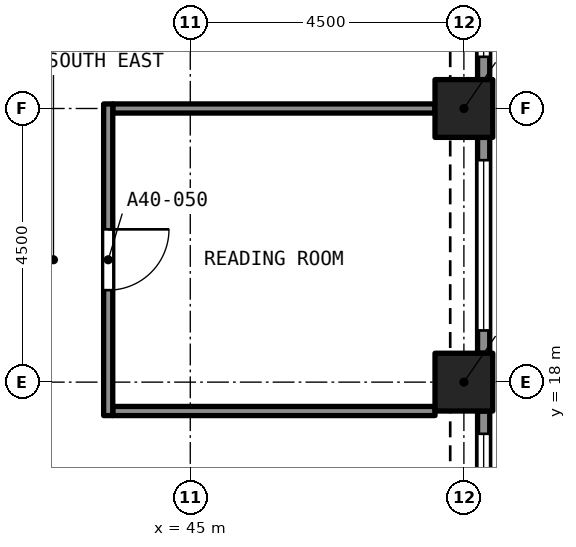
"""IFC4 building model, lengths in metres.
Left out: names, types, materials, properties, quantities, classifications, styles, units other than length and angle.
Written with IfcOpenShell. Run it as: python <this file> out.ifc"""

import sys

from ifc_helpers import new_model, si_unit, direction, frame, frame_2d, origin, origin_2d, place, context, subcontext, project, spatial, rectangle, extrude, element, fill, save


model = new_model("IFC4")
c1 = context("Model", 3, precision=1e-05, world=origin(), true_north=direction((0.0, 1.0)))
c2 = subcontext(c1, "Body", "Model", "MODEL_VIEW")
j1 = project(units=[si_unit("LENGTHUNIT", "METRE"), si_unit("PLANEANGLEUNIT", "RADIAN")], contexts=[c1])
p1 = place(None, origin())
s1 = spatial("IfcSite", under=j1, at=p1, CompositionType="ELEMENT")
p2 = place(p1, origin())
s2 = spatial("IfcBuilding", under=s1, at=p2, CompositionType="ELEMENT")
p3 = place(p2, frame((0.0, 0.0, 143.0)))
s3 = spatial("IfcBuildingStorey", under=s2, at=p3, CompositionType="ELEMENT", Elevation=143.0)
for number, where, z_axis, x_axis in (
    (1, (49.5, 18.0, 0.0), (0.0, 0.0, 1.0), (1.0, 0.0, 0.0)),
    (2, (49.5, 22.5, 0.0), (0.0, 0.0, 1.0), (1.0, 0.0, 0.0)),
):
    element("IfcColumn", number, at=place(p3, frame(where, z_axis=z_axis, x_axis=x_axis)), inside=s3, PredefinedType="COLUMN", context=c2, shape_type="SweptSolid", body=[
        extrude(rectangle(XDim=0.95, YDim=0.95, at=origin_2d()), origin(), (0.0, 0.0, 1.0), 3.2),
    ])
p4 = place(p3, frame((49.825, 17.525, 0.0), z_axis=(0.0, 0.0, 1.0), x_axis=(0.0, -1.0, 0.0)))
e3 = element("IfcWall", 3, at=p4, inside=s3, PredefinedType="SOLIDWALL", context=c2, shape_type="SweptSolid", body=[
    extrude(rectangle(XDim=3.55, YDim=0.2, at=frame_2d((1.775, 0.0))), origin(), (0.0, 0.0, 1.0), 3.2),
])
p5 = place(p4, frame((0.375, 0.0, 0.45)))
e4 = element("IfcOpeningElement", 4, at=p5, cuts=e3, PredefinedType="OPENING", context=c2, shape_type="SweptSolid", body=[
    extrude(rectangle(XDim=2.8, YDim=1.95, at=frame_2d((1.4, 0.975))), frame((0.0, 0.11, 0.0), z_axis=(0.0, -1.0, 0.0), x_axis=(1.0, 0.0, 0.0)), (0.0, 0.0, 1.0), 0.22),
])
p6 = place(p3, frame((49.825, 22.025, 0.0), z_axis=(0.0, 0.0, 1.0), x_axis=(0.0, -1.0, 0.0)))
e5 = element("IfcWall", 5, at=p6, inside=s3, PredefinedType="SOLIDWALL", context=c2, shape_type="SweptSolid", body=[
    extrude(rectangle(XDim=3.55, YDim=0.2, at=frame_2d((1.775, 0.0))), origin(), (0.0, 0.0, 1.0), 3.2),
])
p7 = place(p6, frame((0.375, 0.0, 0.45)))
e6 = element("IfcOpeningElement", 6, at=p7, cuts=e5, PredefinedType="OPENING", context=c2, shape_type="SweptSolid", body=[
    extrude(rectangle(XDim=2.8, YDim=1.95, at=frame_2d((1.4, 0.975))), frame((0.0, 0.11, 0.0), z_axis=(0.0, -1.0, 0.0), x_axis=(1.0, 0.0, 0.0)), (0.0, 0.0, 1.0), 0.22),
])
p8 = place(p3, frame((49.825, 26.525, 0.0), z_axis=(0.0, 0.0, 1.0), x_axis=(0.0, -1.0, 0.0)))
e7 = element("IfcWall", 7, at=p8, inside=s3, PredefinedType="SOLIDWALL", context=c2, shape_type="SweptSolid", body=[
    extrude(rectangle(XDim=3.55, YDim=0.2, at=frame_2d((1.775, 0.0))), origin(), (0.0, 0.0, 1.0), 3.2),
])
p9 = place(p8, frame((0.375, 0.0, 0.45)))
e8 = element("IfcOpeningElement", 8, at=p9, cuts=e7, PredefinedType="OPENING", context=c2, shape_type="SweptSolid", body=[
    extrude(rectangle(XDim=2.8, YDim=1.95, at=frame_2d((1.4, 0.975))), frame((0.0, 0.11, 0.0), z_axis=(0.0, -1.0, 0.0), x_axis=(1.0, 0.0, 0.0)), (0.0, 0.0, 1.0), 0.22),
])
for number, where, z_axis, x_axis in (
    (9, (43.725, 17.525, 0.0), (0.0, 0.0, 1.0), (1.0, 0.0, 0.0)),
    (10, (43.725, 22.5, 0.0), (0.0, 0.0, 1.0), (1.0, 0.0, 0.0)),
):
    element("IfcWall", number, at=place(p3, frame(where, z_axis=z_axis, x_axis=x_axis)), inside=s3, PredefinedType="PARTITIONING", context=c2, shape_type="SweptSolid", body=[
        extrude(rectangle(XDim=5.3, YDim=0.15, at=frame_2d((2.65, 0.0))), origin(), (0.0, 0.0, 1.0), 2.9),
    ])
p10 = place(p3, frame((43.65, 22.575, 0.0), z_axis=(0.0, 0.0, 1.0), x_axis=(0.0, -1.0, 0.0)))
e11 = element("IfcWall", 11, at=p10, inside=s3, PredefinedType="PARTITIONING", context=c2, shape_type="SweptSolid", body=[
    extrude(rectangle(XDim=5.125, YDim=0.15, at=frame_2d((2.562, 0.0))), origin(), (0.0, 0.0, 1.0), 2.9),
])
p11 = place(p10, frame((2.062, 0.0, 0.0)))
e12 = element("IfcOpeningElement", 12, at=p11, cuts=e11, PredefinedType="OPENING", context=c2, shape_type="SweptSolid", body=[
    extrude(rectangle(XDim=1.0, YDim=2.1, at=frame_2d((0.5, 1.05))), frame((0.0, 0.085, 0.0), z_axis=(0.0, -1.0, 0.0), x_axis=(1.0, 0.0, 0.0)), (0.0, 0.0, 1.0), 0.17),
])
p12 = place(p5, origin())
e13 = element("IfcWindow", 13, at=p12, inside=s3, PartitioningType="SINGLE_PANEL", PredefinedType="WINDOW", context=c2, shape_type="SweptSolid", body=[
    extrude(rectangle(XDim=2.8, YDim=1.95, at=frame_2d((1.4, 0.975))), frame((0.0, 0.03, 0.0), z_axis=(0.0, -1.0, 0.0), x_axis=(1.0, 0.0, 0.0)), (0.0, 0.0, 1.0), 0.06),
])
fill(e4, e13)
p13 = place(p7, origin())
e14 = element("IfcWindow", 14, at=p13, inside=s3, PartitioningType="SINGLE_PANEL", PredefinedType="WINDOW", context=c2, shape_type="SweptSolid", body=[
    extrude(rectangle(XDim=2.8, YDim=1.95, at=frame_2d((1.4, 0.975))), frame((0.0, 0.03, 0.0), z_axis=(0.0, -1.0, 0.0), x_axis=(1.0, 0.0, 0.0)), (0.0, 0.0, 1.0), 0.06),
])
fill(e6, e14)
p14 = place(p9, origin())
e15 = element("IfcWindow", 15, at=p14, inside=s3, PartitioningType="SINGLE_PANEL", PredefinedType="WINDOW", context=c2, shape_type="SweptSolid", body=[
    extrude(rectangle(XDim=2.8, YDim=1.95, at=frame_2d((1.4, 0.975))), frame((0.0, 0.03, 0.0), z_axis=(0.0, -1.0, 0.0), x_axis=(1.0, 0.0, 0.0)), (0.0, 0.0, 1.0), 0.06),
])
fill(e8, e15)
p15 = place(p11, origin())
e16 = element("IfcDoor", 16, at=p15, inside=s3, OperationType="SINGLE_SWING_RIGHT", PredefinedType="DOOR", context=c2, shape_type="SweptSolid", body=[
    extrude(rectangle(XDim=1.0, YDim=2.1, at=frame_2d((0.5, 1.05))), frame((0.0, 0.025, 0.0), z_axis=(0.0, -1.0, 0.0), x_axis=(1.0, 0.0, 0.0)), (0.0, 0.0, 1.0), 0.05),
])
fill(e12, e16)
save(model, sys.argv[1])
